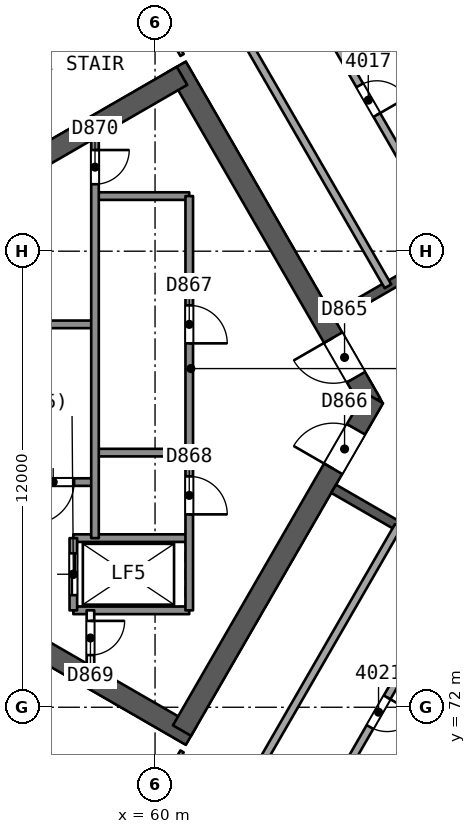
"""IFC4 building model, lengths in metres.
Left out: names, types, materials, properties, quantities, classifications, styles, units other than length and angle.
Written with IfcOpenShell. Run it as: python <this file> out.ifc"""

import sys

from ifc_helpers import new_model, si_unit, direction, frame, frame_2d, origin, place, context, subcontext, project, spatial, rectangle, extrude, element, fill, save


model = new_model("IFC4")
c1 = context("Model", 3, precision=1e-05, world=origin(), true_north=direction((0.0, 1.0)))
c2 = subcontext(c1, "Body", "Model", "MODEL_VIEW")
j1 = project(units=[si_unit("LENGTHUNIT", "METRE"), si_unit("PLANEANGLEUNIT", "RADIAN")], contexts=[c1])
p1 = place(None, origin())
s1 = spatial("IfcSite", under=j1, at=p1, CompositionType="ELEMENT")
p2 = place(p1, origin())
s2 = spatial("IfcBuilding", under=s1, at=p2, CompositionType="ELEMENT")
p3 = place(p2, frame((0.0, 0.0, 167.4)))
s3 = spatial("IfcBuildingStorey", under=s2, at=p3, CompositionType="ELEMENT", Elevation=167.4)
p4 = place(p3, frame((65.682, 80.0, 0.0), z_axis=(0.0, 0.0, 1.0), x_axis=(-0.500000202252, 0.866025287014, 0.0)))
e1 = element("IfcWall", 1, at=p4, inside=s3, PredefinedType="SHEAR", context=c2, shape_type="SweptSolid", body=[
    extrude(rectangle(XDim=10.221, YDim=0.55, at=frame_2d((5.111, 0.0))), origin(), (0.0, 0.0, 1.0), 3.7),
])
p5 = place(p4, frame((0.791, 0.0, 0.0)))
e2 = element("IfcOpeningElement", 2, at=p5, cuts=e1, PredefinedType="OPENING", context=c2, shape_type="SweptSolid", body=[
    extrude(rectangle(XDim=1.2, YDim=2.1, at=frame_2d((0.6, 1.05))), frame((0.0, 0.286, 0.0), z_axis=(0.0, -1.0, 0.0), x_axis=(1.0, 0.0, 0.0)), (0.0, 0.0, 1.0), 0.571),
])
p6 = place(p3, frame((60.709, 88.614, 0.0), z_axis=(0.0, 0.0, 1.0), x_axis=(-0.866020164116, -0.500009075263, 0.0)))
e3 = element("IfcWall", 3, at=p6, inside=s3, PredefinedType="SHEAR", context=c2, shape_type="SweptSolid", body=[
    extrude(rectangle(XDim=14.058, YDim=0.55, at=frame_2d((7.029, 0.0))), origin(), (0.0, 0.0, 1.0), 3.7),
])
p7 = place(p3, frame((48.672, 78.336, 0.0), z_axis=(0.0, 0.0, 1.0), x_axis=(0.866023530946, -0.500003243837, 0.0)))
e4 = element("IfcWall", 4, at=p7, inside=s3, PredefinedType="SHEAR", context=c2, shape_type="SweptSolid", body=[
    extrude(rectangle(XDim=14.175, YDim=0.55, at=frame_2d((7.087, 0.0))), origin(), (0.0, 0.0, 1.0), 3.7),
])
p8 = place(p3, frame((60.709, 71.386, 0.0), z_axis=(0.0, 0.0, 1.0), x_axis=(0.500015938302, 0.866016201606, 0.0)))
e5 = element("IfcWall", 5, at=p8, inside=s3, PredefinedType="SHEAR", context=c2, shape_type="SweptSolid", body=[
    extrude(rectangle(XDim=10.105, YDim=0.55, at=frame_2d((5.053, 0.0))), origin(), (0.0, 0.0, 1.0), 3.7),
])
p9 = place(p8, frame((7.955, 0.0, 0.0)))
e6 = element("IfcOpeningElement", 6, at=p9, cuts=e5, PredefinedType="OPENING", context=c2, shape_type="SweptSolid", body=[
    extrude(rectangle(XDim=1.2, YDim=2.1, at=frame_2d((0.6, 1.05))), frame((0.0, 0.286, 0.0), z_axis=(0.0, -1.0, 0.0), x_axis=(1.0, 0.0, 0.0)), (0.0, 0.0, 1.0), 0.571),
])
p10 = place(p3, frame((78.2, 90.046, 0.0), z_axis=(0.0, 0.0, 1.0), x_axis=(-0.866026492143, -0.499998114903, 0.0)))
e7 = element("IfcWall", 7, at=p10, inside=s3, PredefinedType="SHEAR", context=c2, shape_type="SweptSolid", body=[
    extrude(rectangle(XDim=15.588, YDim=0.25, at=frame_2d((7.794, 0.0))), origin(), (0.0, 0.0, 1.0), 3.25),
])
p11 = place(p10, frame((3.138, 0.0, 0.0)))
e8 = element("IfcOpeningElement", 8, at=p11, cuts=e7, PredefinedType="OPENING", context=c2, shape_type="SweptSolid", body=[
    extrude(rectangle(XDim=1.0, YDim=2.1, at=frame_2d((0.5, 1.05))), frame((0.0, 0.135, 0.0), z_axis=(0.0, -1.0, 0.0), x_axis=(1.0, 0.0, 0.0)), (0.0, 0.0, 1.0), 0.271),
])
p12 = place(p10, frame((5.629, 0.0, 0.0)))
e9 = element("IfcOpeningElement", 9, at=p12, cuts=e7, PredefinedType="OPENING", context=c2, shape_type="SweptSolid", body=[
    extrude(rectangle(XDim=0.9, YDim=2.1, at=frame_2d((0.45, 1.05))), frame((0.0, 0.135, 0.0), z_axis=(0.0, -1.0, 0.0), x_axis=(1.0, 0.0, 0.0)), (0.0, 0.0, 1.0), 0.271),
])
p13 = place(p10, frame((8.435, 0.0, 0.0)))
e10 = element("IfcOpeningElement", 10, at=p13, cuts=e7, PredefinedType="OPENING", context=c2, shape_type="SweptSolid", body=[
    extrude(rectangle(XDim=0.9, YDim=2.1, at=frame_2d((0.45, 1.05))), frame((0.0, 0.135, 0.0), z_axis=(0.0, -1.0, 0.0), x_axis=(1.0, 0.0, 0.0)), (0.0, 0.0, 1.0), 0.271),
])
p14 = place(p10, frame((12.438, 0.0, 0.0)))
e11 = element("IfcOpeningElement", 11, at=p14, cuts=e7, PredefinedType="OPENING", context=c2, shape_type="SweptSolid", body=[
    extrude(rectangle(XDim=1.0, YDim=2.1, at=frame_2d((0.5, 1.05))), frame((0.0, 0.135, 0.0), z_axis=(0.0, -1.0, 0.0), x_axis=(1.0, 0.0, 0.0)), (0.0, 0.0, 1.0), 0.271),
])
p15 = place(p3, frame((64.7, 77.748, 0.0), z_axis=(0.0, 0.0, 1.0), x_axis=(0.866026492143, -0.499998114903, 0.0)))
e12 = element("IfcWall", 12, at=p15, inside=s3, PredefinedType="SHEAR", context=c2, shape_type="SweptSolid", body=[
    extrude(rectangle(XDim=15.588, YDim=0.25, at=frame_2d((7.794, 0.0))), origin(), (0.0, 0.0, 1.0), 3.25),
])
p16 = place(p15, frame((2.462, 0.0, 0.0)))
e13 = element("IfcOpeningElement", 13, at=p16, cuts=e12, PredefinedType="OPENING", context=c2, shape_type="SweptSolid", body=[
    extrude(rectangle(XDim=1.0, YDim=2.1, at=frame_2d((0.5, 1.05))), frame((0.0, 0.135, 0.0), z_axis=(0.0, -1.0, 0.0), x_axis=(1.0, 0.0, 0.0)), (0.0, 0.0, 1.0), 0.271),
])
p17 = place(p15, frame((8.129, 0.0, 0.0)))
e14 = element("IfcOpeningElement", 14, at=p17, cuts=e12, PredefinedType="OPENING", context=c2, shape_type="SweptSolid", body=[
    extrude(rectangle(XDim=1.2, YDim=2.4, at=frame_2d((0.6, 1.2))), frame((0.0, 0.135, 0.0), z_axis=(0.0, -1.0, 0.0), x_axis=(1.0, 0.0, 0.0)), (0.0, 0.0, 1.0), 0.271),
])
p18 = place(p15, frame((11.762, 0.0, 0.0)))
e15 = element("IfcOpeningElement", 15, at=p18, cuts=e12, PredefinedType="OPENING", context=c2, shape_type="SweptSolid", body=[
    extrude(rectangle(XDim=1.0, YDim=2.1, at=frame_2d((0.5, 1.05))), frame((0.0, 0.135, 0.0), z_axis=(0.0, -1.0, 0.0), x_axis=(1.0, 0.0, 0.0)), (0.0, 0.0, 1.0), 0.271),
])
for number, where, z_axis, x_axis in (
    (16, (65.981, 96.244, 0.0), (0.0, 0.0, 1.0), (0.5, -0.866, 0.0)),
    (17, (63.552, 94.841, 0.0), (0.0, 0.0, 1.0), (0.5, -0.866, 0.0)),
):
    element("IfcWall", number, at=place(p3, frame(where, z_axis=z_axis, x_axis=x_axis)), inside=s3, PredefinedType="PARTITIONING", context=c2, shape_type="SweptSolid", body=[
        extrude(rectangle(XDim=11.477, YDim=0.2, at=frame_2d((5.739, 0.0))), origin(), (0.0, 0.0, 1.0), 3.25),
    ])
p19 = place(p3, frame((58.961, 92.191, 0.0), z_axis=(0.0, 0.0, 1.0), x_axis=(0.499982229883, -0.866035663123, 0.0)))
e18 = element("IfcWall", 18, at=p19, inside=s3, PredefinedType="PARTITIONING", context=c2, shape_type="SweptSolid", body=[
    extrude(rectangle(XDim=3.498, YDim=0.1, at=frame_2d((1.749, 0.0))), origin(), (0.0, 0.0, 1.0), 3.25),
])
p20 = place(p19, frame((1.299, 0.0, 0.0)))
e19 = element("IfcOpeningElement", 19, at=p20, cuts=e18, PredefinedType="OPENING", context=c2, shape_type="SweptSolid", body=[
    extrude(rectangle(XDim=0.9, YDim=2.1, at=frame_2d((0.45, 1.05))), frame((0.0, 0.061, 0.0), z_axis=(0.0, -1.0, 0.0), x_axis=(1.0, 0.0, 0.0)), (0.0, 0.0, 1.0), 0.121),
])
p21 = place(p3, frame((66.129, 83.077, 0.0), z_axis=(0.0, 0.0, 1.0), x_axis=(-0.5000018851, 0.866024315419, 0.0)))
e20 = element("IfcWall", 20, at=p21, inside=s3, PredefinedType="PARTITIONING", context=c2, shape_type="SweptSolid", body=[
    extrude(rectangle(XDim=9.0, YDim=0.2, at=frame_2d((4.5, 0.0))), origin(), (0.0, 0.0, 1.0), 3.25),
])
p22 = place(p3, frame((63.361, 91.871, 0.0), z_axis=(0.0, 0.0, 1.0), x_axis=(0.5000018851, -0.866024315419, 0.0)))
e21 = element("IfcWall", 21, at=p22, inside=s3, PredefinedType="PARTITIONING", context=c2, shape_type="SweptSolid", body=[
    extrude(rectangle(XDim=9.0, YDim=0.2, at=frame_2d((4.5, 0.0))), origin(), (0.0, 0.0, 1.0), 3.25),
])
p23 = place(p22, frame((4.05, 0.0, 0.0)))
e22 = element("IfcOpeningElement", 22, at=p23, cuts=e21, PredefinedType="OPENING", context=c2, shape_type="SweptSolid", body=[
    extrude(rectangle(XDim=0.9, YDim=2.1, at=frame_2d((0.45, 1.05))), frame((0.0, 0.11, 0.0), z_axis=(0.0, -1.0, 0.0), x_axis=(1.0, 0.0, 0.0)), (0.0, 0.0, 1.0), 0.221),
])
p24 = place(p3, frame((60.71, 70.838, 0.0), z_axis=(0.0, 0.0, 1.0), x_axis=(-0.499982229883, -0.866035663123, 0.0)))
e23 = element("IfcWall", 23, at=p24, inside=s3, PredefinedType="PARTITIONING", context=c2, shape_type="SweptSolid", body=[
    extrude(rectangle(XDim=3.498, YDim=0.1, at=frame_2d((1.749, 0.0))), origin(), (0.0, 0.0, 1.0), 3.25),
])
p25 = place(p24, frame((1.299, 0.0, 0.0)))
e24 = element("IfcOpeningElement", 24, at=p25, cuts=e23, PredefinedType="OPENING", context=c2, shape_type="SweptSolid", body=[
    extrude(rectangle(XDim=0.9, YDim=2.1, at=frame_2d((0.45, 1.05))), frame((0.0, 0.061, 0.0), z_axis=(0.0, -1.0, 0.0), x_axis=(1.0, 0.0, 0.0)), (0.0, 0.0, 1.0), 0.121),
])
p26 = place(p3, frame((68.131, 75.767, 0.0), z_axis=(0.0, 0.0, 1.0), x_axis=(-0.5000018851, -0.866024315419, 0.0)))
e25 = element("IfcWall", 25, at=p26, inside=s3, PredefinedType="PARTITIONING", context=c2, shape_type="SweptSolid", body=[
    extrude(rectangle(XDim=9.0, YDim=0.2, at=frame_2d((4.5, 0.0))), origin(), (0.0, 0.0, 1.0), 3.25),
])
p27 = place(p26, frame((4.05, 0.0, 0.0)))
e26 = element("IfcOpeningElement", 26, at=p27, cuts=e25, PredefinedType="OPENING", context=c2, shape_type="SweptSolid", body=[
    extrude(rectangle(XDim=0.9, YDim=2.1, at=frame_2d((0.45, 1.05))), frame((0.0, 0.11, 0.0), z_axis=(0.0, -1.0, 0.0), x_axis=(1.0, 0.0, 0.0)), (0.0, 0.0, 1.0), 0.221),
])
p28 = place(p3, frame((61.899, 68.973, 0.0), z_axis=(0.0, 0.0, 1.0), x_axis=(0.5000018851, 0.866024315419, 0.0)))
e27 = element("IfcWall", 27, at=p28, inside=s3, PredefinedType="PARTITIONING", context=c2, shape_type="SweptSolid", body=[
    extrude(rectangle(XDim=9.0, YDim=0.2, at=frame_2d((4.5, 0.0))), origin(), (0.0, 0.0, 1.0), 3.25),
])
p29 = place(p3, frame((64.092, 64.847, 0.0), z_axis=(0.0, 0.0, 1.0), x_axis=(0.499998657322, 0.866026178979, 0.0)))
e28 = element("IfcWall", 28, at=p29, inside=s3, PredefinedType="PARTITIONING", context=c2, shape_type="SweptSolid", body=[
    extrude(rectangle(XDim=11.477, YDim=0.2, at=frame_2d((5.739, 0.0))), origin(), (0.0, 0.0, 1.0), 3.25),
])
p30 = place(p3, frame((42.319, 82.755, 0.0), z_axis=(0.0, 0.0, 1.0), x_axis=(0.866024017239, 0.50000240156, 0.0)))
e29 = element("IfcWall", 29, at=p30, inside=s3, PredefinedType="SOLIDWALL", context=c2, shape_type="SweptSolid", body=[
    extrude(rectangle(XDim=53.85, YDim=0.3, at=frame_2d((26.925, 0.0))), origin(), (0.0, 0.0, 1.0), 3.25),
])
p31 = place(p30, frame((20.581, 0.0, 0.0)))
e30 = element("IfcOpeningElement", 30, at=p31, cuts=e29, PredefinedType="OPENING", context=c2, shape_type="SweptSolid", body=[
    extrude(rectangle(XDim=2.4, YDim=2.4, at=frame_2d((1.2, 1.2))), frame((0.0, 0.161, 0.0), z_axis=(0.0, -1.0, 0.0), x_axis=(1.0, 0.0, 0.0)), (0.0, 0.0, 1.0), 0.321),
])
p32 = place(p30, frame((9.622, 0.0, 0.0)))
e31 = element("IfcOpeningElement", 31, at=p32, cuts=e29, PredefinedType="OPENING", context=c2, shape_type="SweptSolid", body=[
    extrude(rectangle(XDim=2.4, YDim=2.4, at=frame_2d((1.2, 1.2))), frame((0.0, 0.161, 0.0), z_axis=(0.0, -1.0, 0.0), x_axis=(1.0, 0.0, 0.0)), (0.0, 0.0, 1.0), 0.321),
])
p33 = place(p30, frame((40.79, 0.0, 0.0)))
e32 = element("IfcOpeningElement", 32, at=p33, cuts=e29, PredefinedType="OPENING", context=c2, shape_type="SweptSolid", body=[
    extrude(rectangle(XDim=2.4, YDim=2.4, at=frame_2d((1.2, 1.2))), frame((0.0, 0.161, 0.0), z_axis=(0.0, -1.0, 0.0), x_axis=(1.0, 0.0, 0.0)), (0.0, 0.0, 1.0), 0.321),
])
p34 = place(p30, frame((27.74, 0.0, 0.9)))
e33 = element("IfcOpeningElement", 33, at=p34, cuts=e29, PredefinedType="OPENING", context=c2, shape_type="SweptSolid", body=[
    extrude(rectangle(XDim=1.8, YDim=1.5, at=frame_2d((0.9, 0.75))), frame((0.0, 0.161, 0.0), z_axis=(0.0, -1.0, 0.0), x_axis=(1.0, 0.0, 0.0)), (0.0, 0.0, 1.0), 0.321),
])
p35 = place(p30, frame((24.934, 0.0, 0.9)))
e34 = element("IfcOpeningElement", 34, at=p35, cuts=e29, PredefinedType="OPENING", context=c2, shape_type="SweptSolid", body=[
    extrude(rectangle(XDim=1.8, YDim=1.5, at=frame_2d((0.9, 0.75))), frame((0.0, 0.161, 0.0), z_axis=(0.0, -1.0, 0.0), x_axis=(1.0, 0.0, 0.0)), (0.0, 0.0, 1.0), 0.321),
])
p36 = place(p3, frame((88.955, 50.32, 0.0), z_axis=(0.0, 0.0, 1.0), x_axis=(-0.866024017239, 0.50000240156, 0.0)))
e35 = element("IfcWall", 35, at=p36, inside=s3, PredefinedType="SOLIDWALL", context=c2, shape_type="SweptSolid", body=[
    extrude(rectangle(XDim=53.85, YDim=0.3, at=frame_2d((26.925, 0.0))), origin(), (0.0, 0.0, 1.0), 3.25),
])
p37 = place(p36, frame((30.557, 0.0, 0.0)))
e36 = element("IfcOpeningElement", 36, at=p37, cuts=e35, PredefinedType="OPENING", context=c2, shape_type="SweptSolid", body=[
    extrude(rectangle(XDim=2.4, YDim=2.4, at=frame_2d((1.2, 1.2))), frame((0.0, 0.161, 0.0), z_axis=(0.0, -1.0, 0.0), x_axis=(1.0, 0.0, 0.0)), (0.0, 0.0, 1.0), 0.321),
])
p38 = place(p36, frame((41.847, 0.0, 0.0)))
e37 = element("IfcOpeningElement", 37, at=p38, cuts=e35, PredefinedType="OPENING", context=c2, shape_type="SweptSolid", body=[
    extrude(rectangle(XDim=2.4, YDim=2.4, at=frame_2d((1.2, 1.2))), frame((0.0, 0.161, 0.0), z_axis=(0.0, -1.0, 0.0), x_axis=(1.0, 0.0, 0.0)), (0.0, 0.0, 1.0), 0.321),
])
p39 = place(p36, frame((10.349, 0.0, 0.0)))
e38 = element("IfcOpeningElement", 38, at=p39, cuts=e35, PredefinedType="OPENING", context=c2, shape_type="SweptSolid", body=[
    extrude(rectangle(XDim=2.4, YDim=2.4, at=frame_2d((1.2, 1.2))), frame((0.0, 0.161, 0.0), z_axis=(0.0, -1.0, 0.0), x_axis=(1.0, 0.0, 0.0)), (0.0, 0.0, 1.0), 0.321),
])
p40 = place(p36, frame((25.09, 0.0, 0.9)))
e39 = element("IfcOpeningElement", 39, at=p40, cuts=e35, PredefinedType="OPENING", context=c2, shape_type="SweptSolid", body=[
    extrude(rectangle(XDim=1.8, YDim=1.5, at=frame_2d((0.9, 0.75))), frame((0.0, 0.161, 0.0), z_axis=(0.0, -1.0, 0.0), x_axis=(1.0, 0.0, 0.0)), (0.0, 0.0, 1.0), 0.321),
])
p41 = place(p3, frame((60.9, 85.45, 0.0), z_axis=(0.0, 0.0, 1.0), x_axis=(-1.0, 0.0, 0.0)))
e40 = element("IfcWall", 40, at=p41, inside=s3, PredefinedType="SOLIDWALL", context=c2, shape_type="SweptSolid", body=[
    extrude(rectangle(XDim=2.48, YDim=0.2, at=frame_2d((1.24, 0.0))), origin(), (0.0, 0.0, 1.0), 3.25),
])
p42 = place(p3, frame((58.42, 82.075, 0.0), z_axis=(0.0, 0.0, 1.0), x_axis=(-1.0, 0.0, 0.0)))
e41 = element("IfcWall", 41, at=p42, inside=s3, PredefinedType="SOLIDWALL", context=c2, shape_type="SweptSolid", body=[
    extrude(rectangle(XDim=7.7, YDim=0.2, at=frame_2d((3.85, 0.0))), origin(), (0.0, 0.0, 1.0), 3.25),
])
p43 = place(p3, frame((60.9, 78.7, 0.0), z_axis=(0.0, 0.0, 1.0), x_axis=(-1.0, 0.0, 0.0)))
e42 = element("IfcWall", 42, at=p43, inside=s3, PredefinedType="SOLIDWALL", context=c2, shape_type="SweptSolid", body=[
    extrude(rectangle(XDim=2.48, YDim=0.2, at=frame_2d((1.24, 0.0))), origin(), (0.0, 0.0, 1.0), 3.25),
])
p44 = place(p3, frame((58.42, 77.925, 0.0), z_axis=(0.0, 0.0, 1.0), x_axis=(-1.0, 0.0, 0.0)))
e43 = element("IfcWall", 43, at=p44, inside=s3, PredefinedType="SOLIDWALL", context=c2, shape_type="SweptSolid", body=[
    extrude(rectangle(XDim=7.7, YDim=0.2, at=frame_2d((3.85, 0.0))), origin(), (0.0, 0.0, 1.0), 3.25),
])
p45 = place(p44, frame((0.55, 0.0, 0.0)))
e44 = element("IfcOpeningElement", 44, at=p45, cuts=e43, PredefinedType="OPENING", context=c2, shape_type="SweptSolid", body=[
    extrude(rectangle(XDim=1.1, YDim=2.1, at=frame_2d((0.55, 1.05))), frame((0.0, 0.11, 0.0), z_axis=(0.0, -1.0, 0.0), x_axis=(1.0, 0.0, 0.0)), (0.0, 0.0, 1.0), 0.221),
])
for number, where, z_axis, x_axis in (
    (45, (60.9, 76.45, 0.0), (0.0, 0.0, 1.0), (-1.0, 0.0, 0.0)),
    (46, (60.9, 74.55, 0.0), (0.0, 0.0, 1.0), (-1.0, 0.0, 0.0)),
):
    element("IfcWall", number, at=place(p3, frame(where, z_axis=z_axis, x_axis=x_axis)), inside=s3, PredefinedType="SOLIDWALL", context=c2, shape_type="SweptSolid", body=[
        extrude(rectangle(XDim=3.05, YDim=0.2, at=frame_2d((1.525, 0.0))), origin(), (0.0, 0.0, 1.0), 3.25),
    ])
p46 = place(p3, frame((60.9, 85.45, 0.0), z_axis=(0.0, 0.0, 1.0), x_axis=(0.0, -1.0, 0.0)))
e47 = element("IfcWall", 47, at=p46, inside=s3, PredefinedType="SOLIDWALL", context=c2, shape_type="SweptSolid", body=[
    extrude(rectangle(XDim=10.9, YDim=0.2, at=frame_2d((5.45, 0.0))), origin(), (0.0, 0.0, 1.0), 3.25),
])
p47 = place(p46, frame((2.875, 0.0, 0.0)))
e48 = element("IfcOpeningElement", 48, at=p47, cuts=e47, PredefinedType="OPENING", context=c2, shape_type="SweptSolid", body=[
    extrude(rectangle(XDim=1.0, YDim=2.1, at=frame_2d((0.5, 1.05))), frame((0.0, 0.11, 0.0), z_axis=(0.0, -1.0, 0.0), x_axis=(1.0, 0.0, 0.0)), (0.0, 0.0, 1.0), 0.221),
])
p48 = place(p46, frame((7.375, 0.0, 0.0)))
e49 = element("IfcOpeningElement", 49, at=p48, cuts=e47, PredefinedType="OPENING", context=c2, shape_type="SweptSolid", body=[
    extrude(rectangle(XDim=1.0, YDim=2.1, at=frame_2d((0.5, 1.05))), frame((0.0, 0.11, 0.0), z_axis=(0.0, -1.0, 0.0), x_axis=(1.0, 0.0, 0.0)), (0.0, 0.0, 1.0), 0.221),
])
p49 = place(p3, frame((58.42, 86.974, 0.0), z_axis=(0.0, 0.0, 1.0), x_axis=(0.0, -1.0, 0.0)))
e50 = element("IfcWall", 50, at=p49, inside=s3, PredefinedType="SOLIDWALL", context=c2, shape_type="SweptSolid", body=[
    extrude(rectangle(XDim=10.524, YDim=0.2, at=frame_2d((5.262, 0.0))), origin(), (0.0, 0.0, 1.0), 3.25),
])
p50 = place(p49, frame((0.312, 0.0, 0.0)))
e51 = element("IfcOpeningElement", 51, at=p50, cuts=e50, PredefinedType="OPENING", context=c2, shape_type="SweptSolid", body=[
    extrude(rectangle(XDim=0.9, YDim=2.1, at=frame_2d((0.45, 1.05))), frame((0.0, 0.11, 0.0), z_axis=(0.0, -1.0, 0.0), x_axis=(1.0, 0.0, 0.0)), (0.0, 0.0, 1.0), 0.221),
])
p51 = place(p3, frame((58.3, 74.55, 0.0), z_axis=(0.0, 0.0, 1.0), x_axis=(0.0, -1.0, 0.0)))
e52 = element("IfcWall", 52, at=p51, inside=s3, PredefinedType="PARTITIONING", context=c2, shape_type="SweptSolid", body=[
    extrude(rectangle(XDim=1.455, YDim=0.2, at=frame_2d((0.728, 0.0))), origin(), (0.0, 0.0, 1.0), 3.25),
])
p52 = place(p51, frame((0.278, 0.0, 0.0)))
e53 = element("IfcOpeningElement", 53, at=p52, cuts=e52, PredefinedType="OPENING", context=c2, shape_type="SweptSolid", body=[
    extrude(rectangle(XDim=0.9, YDim=2.1, at=frame_2d((0.45, 1.05))), frame((0.0, 0.11, 0.0), z_axis=(0.0, -1.0, 0.0), x_axis=(1.0, 0.0, 0.0)), (0.0, 0.0, 1.0), 0.221),
])
p53 = place(p3, frame((57.85, 76.45, 0.0), z_axis=(0.0, 0.0, 1.0), x_axis=(0.0, -1.0, 0.0)))
e54 = element("IfcWall", 54, at=p53, inside=s3, PredefinedType="SOLIDWALL", context=c2, shape_type="SweptSolid", body=[
    extrude(rectangle(XDim=1.9, YDim=0.2, at=frame_2d((0.95, 0.0))), origin(), (0.0, 0.0, 1.0), 3.25),
])
p54 = place(p53, frame((0.4, 0.0, 0.0)))
e55 = element("IfcOpeningElement", 55, at=p54, cuts=e54, PredefinedType="OPENING", context=c2, shape_type="SweptSolid", body=[
    extrude(rectangle(XDim=1.1, YDim=2.1, at=frame_2d((0.55, 1.05))), frame((0.0, 0.11, 0.0), z_axis=(0.0, -1.0, 0.0), x_axis=(1.0, 0.0, 0.0)), (0.0, 0.0, 1.0), 0.221),
])
p55 = place(p23, origin())
e56 = element("IfcDoor", 56, at=p55, inside=s3, OperationType="SINGLE_SWING_RIGHT", PredefinedType="NOTDEFINED", context=c2, shape_type="SweptSolid", body=[
    extrude(rectangle(XDim=0.9, YDim=2.1, at=frame_2d((0.45, 1.05))), frame((0.0, 0.025, 0.0), z_axis=(0.0, -1.0, 0.0), x_axis=(1.0, 0.0, 0.0)), (0.0, 0.0, 1.0), 0.05),
])
fill(e22, e56)
p56 = place(p27, origin())
e57 = element("IfcDoor", 57, at=p56, inside=s3, OperationType="SINGLE_SWING_LEFT", PredefinedType="NOTDEFINED", context=c2, shape_type="SweptSolid", body=[
    extrude(rectangle(XDim=0.9, YDim=2.1, at=frame_2d((0.45, 1.05))), frame((0.0, 0.025, 0.0), z_axis=(0.0, -1.0, 0.0), x_axis=(1.0, 0.0, 0.0)), (0.0, 0.0, 1.0), 0.05),
])
fill(e26, e57)
p57 = place(p5, origin())
e58 = element("IfcDoor", 58, at=p57, inside=s3, OperationType="SINGLE_SWING_RIGHT", PredefinedType="NOTDEFINED", context=c2, shape_type="SweptSolid", body=[
    extrude(rectangle(XDim=1.2, YDim=2.1, at=frame_2d((0.6, 1.05))), frame((0.0, 0.025, 0.0), z_axis=(0.0, -1.0, 0.0), x_axis=(1.0, 0.0, 0.0)), (0.0, 0.0, 1.0), 0.05),
])
fill(e2, e58)
p58 = place(p9, origin())
e59 = element("IfcDoor", 59, at=p58, inside=s3, OperationType="SINGLE_SWING_LEFT", PredefinedType="NOTDEFINED", context=c2, shape_type="SweptSolid", body=[
    extrude(rectangle(XDim=1.2, YDim=2.1, at=frame_2d((0.6, 1.05))), frame((0.0, 0.025, 0.0), z_axis=(0.0, -1.0, 0.0), x_axis=(1.0, 0.0, 0.0)), (0.0, 0.0, 1.0), 0.05),
])
fill(e6, e59)
p59 = place(p54, origin())
e60 = element("IfcDoor", 60, at=p59, inside=s3, OperationType="SLIDING_TO_RIGHT", PredefinedType="NOTDEFINED", context=c2, shape_type="SweptSolid", body=[
    extrude(rectangle(XDim=1.1, YDim=2.1, at=frame_2d((0.55, 1.05))), frame((0.0, 0.025, 0.0), z_axis=(0.0, -1.0, 0.0), x_axis=(1.0, 0.0, 0.0)), (0.0, 0.0, 1.0), 0.05),
])
fill(e55, e60)
p60 = place(p47, origin())
e61 = element("IfcDoor", 61, at=p60, inside=s3, OperationType="SINGLE_SWING_RIGHT", PredefinedType="NOTDEFINED", context=c2, shape_type="SweptSolid", body=[
    extrude(rectangle(XDim=1.0, YDim=2.1, at=frame_2d((0.5, 1.05))), frame((0.0, 0.025, 0.0), z_axis=(0.0, -1.0, 0.0), x_axis=(1.0, 0.0, 0.0)), (0.0, 0.0, 1.0), 0.05),
])
fill(e48, e61)
p61 = place(p48, origin())
e62 = element("IfcDoor", 62, at=p61, inside=s3, OperationType="SINGLE_SWING_RIGHT", PredefinedType="NOTDEFINED", context=c2, shape_type="SweptSolid", body=[
    extrude(rectangle(XDim=1.0, YDim=2.1, at=frame_2d((0.5, 1.05))), frame((0.0, 0.025, 0.0), z_axis=(0.0, -1.0, 0.0), x_axis=(1.0, 0.0, 0.0)), (0.0, 0.0, 1.0), 0.05),
])
fill(e49, e62)
p62 = place(p52, origin())
e63 = element("IfcDoor", 63, at=p62, inside=s3, OperationType="SINGLE_SWING_LEFT", PredefinedType="NOTDEFINED", context=c2, shape_type="SweptSolid", body=[
    extrude(rectangle(XDim=0.9, YDim=2.1, at=frame_2d((0.45, 1.05))), frame((0.0, 0.025, 0.0), z_axis=(0.0, -1.0, 0.0), x_axis=(1.0, 0.0, 0.0)), (0.0, 0.0, 1.0), 0.05),
])
fill(e53, e63)
p63 = place(p50, origin())
e64 = element("IfcDoor", 64, at=p63, inside=s3, OperationType="SINGLE_SWING_LEFT", PredefinedType="NOTDEFINED", context=c2, shape_type="SweptSolid", body=[
    extrude(rectangle(XDim=0.9, YDim=2.1, at=frame_2d((0.45, 1.05))), frame((0.0, 0.025, 0.0), z_axis=(0.0, -1.0, 0.0), x_axis=(1.0, 0.0, 0.0)), (0.0, 0.0, 1.0), 0.05),
])
fill(e51, e64)
p64 = place(p45, origin())
e65 = element("IfcDoor", 65, at=p64, inside=s3, OperationType="SINGLE_SWING_RIGHT", PredefinedType="NOTDEFINED", context=c2, shape_type="SweptSolid", body=[
    extrude(rectangle(XDim=1.1, YDim=2.1, at=frame_2d((0.55, 1.05))), frame((0.0, 0.025, 0.0), z_axis=(0.0, -1.0, 0.0), x_axis=(1.0, 0.0, 0.0)), (0.0, 0.0, 1.0), 0.05),
])
fill(e44, e65)
save(model, sys.argv[1])
